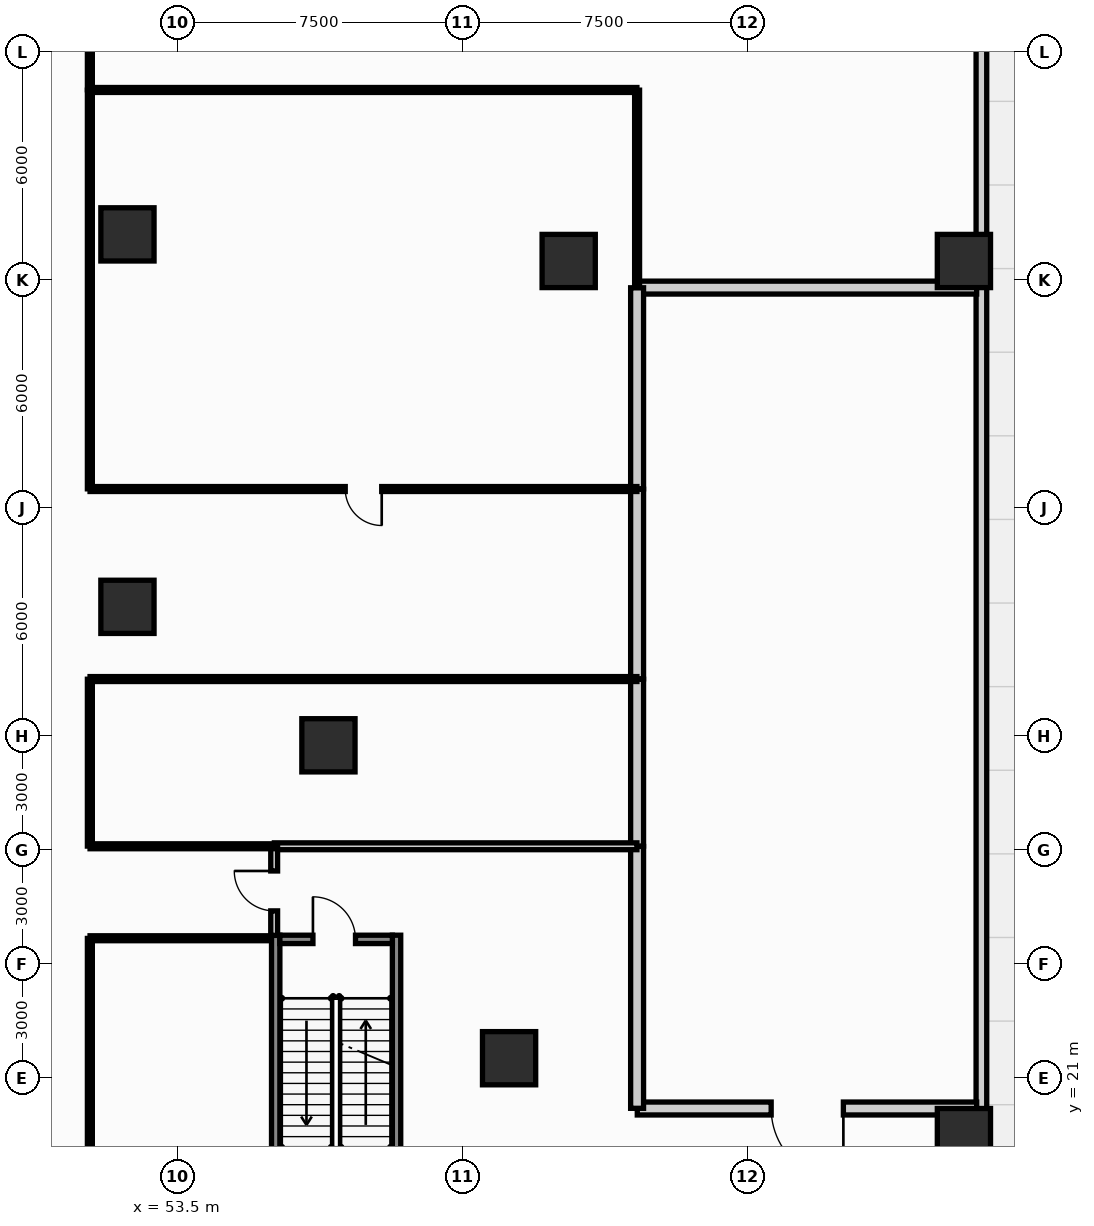
"""IFC4 building model, lengths in metres.
Left out: names, types, materials, properties, quantities, classifications, styles, units other than length and angle.
Written with IfcOpenShell. Run it as: python <this file> out.ifc"""

import sys

from ifc_helpers import new_model, si_unit, direction, frame, frame_2d, origin, origin_2d, place, context, subcontext, project, spatial, rectangle, hollow_rectangle, extrude, source, transform, mapped, element, fill, save


model = new_model("IFC4")
c1 = context("Model", 3, precision=1e-05, world=origin(), true_north=direction((0.0, 1.0)))
c2 = subcontext(c1, "Body", "Model", "MODEL_VIEW")
j1 = project(units=[si_unit("LENGTHUNIT", "METRE"), si_unit("PLANEANGLEUNIT", "RADIAN")], contexts=[c1])
p1 = place(None, origin())
s1 = spatial("IfcSite", under=j1, at=p1, CompositionType="ELEMENT")
p2 = place(p1, origin())
s2 = spatial("IfcBuilding", under=s1, at=p2, CompositionType="ELEMENT")
p3 = place(p2, origin())
s3 = spatial("IfcBuildingStorey", under=s2, at=p3, CompositionType="ELEMENT", Elevation=0.0)
for number, where, z_axis, x_axis in (
    (1, (56.09, 17.18, 0.0), (0.0, 0.0, 1.0), (0.0, 1.0, 0.0)),
    (2, (59.27, 17.18, 0.0), (0.0, 0.0, 1.0), (0.0, 1.0, 0.0)),
):
    element("IfcWall", number, at=place(p3, frame(where, z_axis=z_axis, x_axis=x_axis)), inside=s3, PredefinedType="SHEAR", context=c2, shape_type="SweptSolid", body=[
        extrude(rectangle(XDim=7.58, YDim=0.22, at=frame_2d((3.79, 0.0))), origin(), (0.0, 0.0, 1.0), 5.4),
    ])
p4 = place(p3, frame((56.2, 24.65, 0.0), z_axis=(0.0, 0.0, 1.0), x_axis=(1.0, 0.0, 0.0)))
e3 = element("IfcWall", 3, at=p4, inside=s3, PredefinedType="SHEAR", context=c2, shape_type="SweptSolid", body=[
    extrude(rectangle(XDim=2.96, YDim=0.22, at=frame_2d((1.48, 0.0))), origin(), (0.0, 0.0, 1.0), 5.4),
])
p5 = place(p4, frame((0.87, 0.0, 0.0)))
e4 = element("IfcOpeningElement", 4, at=p5, cuts=e3, PredefinedType="OPENING", context=c2, shape_type="SweptSolid", body=[
    extrude(rectangle(XDim=1.12, YDim=2.15, at=frame_2d((0.56, 1.075))), frame((0.0, 0.122, 0.0), z_axis=(0.0, -1.0, 0.0), x_axis=(1.0, 0.0, 0.0)), (0.0, 0.0, 1.0), 0.244),
])
m1 = source(origin(), c2, "Body", "SweptSolid", [
    extrude(hollow_rectangle(XDim=1.4, YDim=1.4, WallThickness=0.08, at=origin_2d()), origin(), (0.0, 0.0, 1.0), 5.401),
])
p6 = place(p3, frame((62.231, 21.523, 0.0), z_axis=(-0.010395791054, -0.021559966664, 0.999713506644), x_axis=(0.900755489191, -0.434326546151, 0.0)))
e5 = element("IfcColumn", 5, at=p6, inside=s3, PredefinedType="COLUMN", context=c2, shape_type="MappedRepresentation", body=[
    mapped(m1, transform((0.0, 0.0, 0.0), scale=1.0)),
])
m2 = source(origin(), c2, "Body", "SweptSolid", [
    extrude(hollow_rectangle(XDim=1.4, YDim=1.4, WallThickness=0.08, at=origin_2d()), origin(), (0.0, 0.0, 1.0), 5.401),
])
p7 = place(p3, frame((57.478, 29.757, 0.0), z_axis=(-0.014916896444, -0.013786828532, 0.999793683497), x_axis=(0.678742109025, -0.734376708125, 0.0)))
e6 = element("IfcColumn", 6, at=p7, inside=s3, PredefinedType="COLUMN", context=c2, shape_type="MappedRepresentation", body=[
    mapped(m2, transform((0.0, 0.0, 0.0), scale=1.0)),
])
m3 = source(origin(), c2, "Body", "SweptSolid", [
    extrude(hollow_rectangle(XDim=1.4, YDim=1.4, WallThickness=0.08, at=origin_2d()), origin(), (0.0, 0.0, 1.0), 5.4),
])
for number, where, z_axis, x_axis in (
    (7, (52.189, 33.4, 0.0), (0.0, 0.0, 1.0), (1.0, 0.0, 0.0)),
    (8, (52.189, 43.2, 0.0), (0.0, 0.0, 1.0), (1.0, 0.0, 0.0)),
    (9, (74.2, 19.5, 0.0), (0.0, 0.0, 1.0), (1.0, 0.0, 0.0)),
    (10, (74.2, 42.5, 0.0), (0.0, 0.0, 1.0), (1.0, 0.0, 0.0)),
    (11, (63.8, 42.5, 0.0), (0.0, 0.0, 1.0), (1.0, 0.0, 0.0)),
):
    element("IfcColumn", number, at=place(p3, frame(where, z_axis=z_axis, x_axis=x_axis)), inside=s3, PredefinedType="COLUMN", context=c2, shape_type="MappedRepresentation", body=[
        mapped(m3, transform((0.0, 0.0, 0.0), scale=1.0)),
    ])
p8 = place(p3, frame((74.66, 50.2, 0.0), z_axis=(0.0, 0.0, 1.0), x_axis=(0.0, -1.0, 0.0)))
e12 = element("IfcWall", 12, at=p8, inside=s3, PredefinedType="STANDARD", context=c2, shape_type="SweptSolid", body=[
    extrude(rectangle(XDim=46.4, YDim=0.28, at=frame_2d((23.2, 0.0))), origin(), (0.0, 0.0, 1.0), 4.065),
])
p9 = place(p8, frame((40.25, 0.0, 0.0)))
e13 = element("IfcOpeningElement", 13, at=p9, cuts=e12, PredefinedType="OPENING", context=c2, shape_type="SweptSolid", body=[
    extrude(rectangle(XDim=3.9, YDim=3.55, at=frame_2d((1.95, 1.775))), frame((0.0, 0.152, 0.0), z_axis=(0.0, -1.0, 0.0), x_axis=(1.0, 0.0, 0.0)), (0.0, 0.0, 1.0), 0.304),
])
p10 = place(p8, frame((35.5, 0.0, 0.0)))
e14 = element("IfcOpeningElement", 14, at=p10, cuts=e12, PredefinedType="OPENING", context=c2, shape_type="SweptSolid", body=[
    extrude(rectangle(XDim=3.5, YDim=3.55, at=frame_2d((1.75, 1.775))), frame((0.0, 0.152, 0.0), z_axis=(0.0, -1.0, 0.0), x_axis=(1.0, 0.0, 0.0)), (0.0, 0.0, 1.0), 0.304),
])
p11 = place(p8, frame((32.8, 0.0, 0.0)))
e15 = element("IfcOpeningElement", 15, at=p11, cuts=e12, PredefinedType="OPENING", context=c2, shape_type="SweptSolid", body=[
    extrude(rectangle(XDim=2.0, YDim=2.4, at=frame_2d((1.0, 1.2))), frame((0.0, 0.152, 0.0), z_axis=(0.0, -1.0, 0.0), x_axis=(1.0, 0.0, 0.0)), (0.0, 0.0, 1.0), 0.304),
])
p12 = place(p3, frame((74.535, 20.2, 0.0), z_axis=(0.0, 0.0, 1.0), x_axis=(-1.0, 0.0, 0.0)))
e16 = element("IfcWall", 16, at=p12, inside=s3, PredefinedType="PARTITIONING", context=c2, shape_type="SweptSolid", body=[
    extrude(rectangle(XDim=8.93, YDim=0.34, at=frame_2d((4.465, 0.0))), origin(), (0.0, 0.0, 1.0), 4.065),
])
p13 = place(p12, frame((3.507, 0.0, 0.0)))
e17 = element("IfcOpeningElement", 17, at=p13, cuts=e16, PredefinedType="OPENING", context=c2, shape_type="SweptSolid", body=[
    extrude(rectangle(XDim=1.9, YDim=2.35, at=frame_2d((0.95, 1.175))), frame((0.0, 0.182, 0.0), z_axis=(0.0, -1.0, 0.0), x_axis=(1.0, 0.0, 0.0)), (0.0, 0.0, 1.0), 0.364),
])
p14 = place(p3, frame((65.605, 41.8, 0.0), z_axis=(0.0, 0.0, 1.0), x_axis=(1.0, 0.0, 0.0)))
e18 = element("IfcWall", 18, at=p14, inside=s3, PredefinedType="PARTITIONING", context=c2, shape_type="SweptSolid", body=[
    extrude(rectangle(XDim=8.93, YDim=0.34, at=frame_2d((4.465, 0.0))), origin(), (0.0, 0.0, 1.0), 5.08),
])
p15 = place(p3, frame((65.6, 20.205, 0.0), z_axis=(0.0, 0.0, 1.0), x_axis=(0.0, 1.0, 0.0)))
e19 = element("IfcWall", 19, at=p15, inside=s3, PredefinedType="PARTITIONING", context=c2, shape_type="SweptSolid", body=[
    extrude(rectangle(XDim=6.89, YDim=0.34, at=frame_2d((3.445, 0.0))), origin(), (0.0, 0.0, 1.0), 5.08),
])
p16 = place(p3, frame((65.6, 36.505, 0.0), z_axis=(0.0, 0.0, 1.0), x_axis=(0.0, 1.0, 0.0)))
e20 = element("IfcWall", 20, at=p16, inside=s3, PredefinedType="PARTITIONING", context=c2, shape_type="SweptSolid", body=[
    extrude(rectangle(XDim=5.29, YDim=0.34, at=frame_2d((2.645, 0.0))), origin(), (0.0, 0.0, 1.0), 5.08),
])
p17 = place(p3, frame((65.6, 31.505, 0.0), z_axis=(0.0, 0.0, 1.0), x_axis=(0.0, 1.0, 0.0)))
e21 = element("IfcWall", 21, at=p17, inside=s3, PredefinedType="PARTITIONING", context=c2, shape_type="SweptSolid", body=[
    extrude(rectangle(XDim=4.99, YDim=0.34, at=frame_2d((2.495, 0.0))), origin(), (0.0, 0.0, 1.0), 5.08),
])
p18 = place(p3, frame((65.6, 27.105, 0.0), z_axis=(0.0, 0.0, 1.0), x_axis=(0.0, 1.0, 0.0)))
e22 = element("IfcWall", 22, at=p18, inside=s3, PredefinedType="PARTITIONING", context=c2, shape_type="SweptSolid", body=[
    extrude(rectangle(XDim=4.39, YDim=0.34, at=frame_2d((2.195, 0.0))), origin(), (0.0, 0.0, 1.0), 5.08),
])
p19 = place(p3, frame((56.055, 27.1, 0.0), z_axis=(0.0, 0.0, 1.0), x_axis=(1.0, 0.0, 0.0)))
e23 = element("IfcWall", 23, at=p19, inside=s3, PredefinedType="PARTITIONING", context=c2, shape_type="SweptSolid", body=[
    extrude(rectangle(XDim=9.54, YDim=0.18, at=frame_2d((4.77, 0.0))), origin(), (0.0, 0.0, 1.0), 5.08),
])
p20 = place(p3, frame((56.05, 24.755, 0.0), z_axis=(0.0, 0.0, 1.0), x_axis=(0.0, 1.0, 0.0)))
e24 = element("IfcWall", 24, at=p20, inside=s3, PredefinedType="PARTITIONING", context=c2, shape_type="SweptSolid", body=[
    extrude(rectangle(XDim=2.34, YDim=0.18, at=frame_2d((1.17, 0.0))), origin(), (0.0, 0.0, 1.0), 5.08),
])
p21 = place(p20, frame((0.645, 0.0, 0.0)))
e25 = element("IfcOpeningElement", 25, at=p21, cuts=e24, PredefinedType="OPENING", context=c2, shape_type="SweptSolid", body=[
    extrude(rectangle(XDim=1.05, YDim=2.15, at=frame_2d((0.525, 1.075))), frame((0.0, 0.102, 0.0), z_axis=(0.0, -1.0, 0.0), x_axis=(1.0, 0.0, 0.0)), (0.0, 0.0, 1.0), 0.204),
])
p22 = place(p3, frame((65.595, 36.5, 0.0), z_axis=(0.0, 0.0, 1.0), x_axis=(-1.0, 0.0, 0.0)))
e26 = element("IfcWall", 26, at=p22, inside=s3, PredefinedType="PARTITIONING", context=c2, shape_type="SweptSolid", body=[
    extrude(rectangle(XDim=14.39, YDim=0.13, at=frame_2d((7.195, 0.0))), origin(), (0.0, 0.0, 1.0), 5.08),
])
p23 = place(p22, frame((6.715, 0.0, 0.0)))
e27 = element("IfcOpeningElement", 27, at=p23, cuts=e26, PredefinedType="OPENING", context=c2, shape_type="SweptSolid", body=[
    extrude(rectangle(XDim=0.96, YDim=2.15, at=frame_2d((0.48, 1.075))), frame((0.0, 0.077, 0.0), z_axis=(0.0, -1.0, 0.0), x_axis=(1.0, 0.0, 0.0)), (0.0, 0.0, 1.0), 0.154),
])
for number, where, z_axis, x_axis in (
    (28, (51.205, 31.5, 0.0), (0.0, 0.0, 1.0), (1.0, 0.0, 0.0)),
    (29, (51.205, 47.0, 0.0), (0.0, 0.0, 1.0), (1.0, 0.0, 0.0)),
):
    element("IfcWall", number, at=place(p3, frame(where, z_axis=z_axis, x_axis=x_axis)), inside=s3, PredefinedType="PARTITIONING", context=c2, shape_type="SweptSolid", body=[
        extrude(rectangle(XDim=14.39, YDim=0.13, at=frame_2d((7.195, 0.0))), origin(), (0.0, 0.0, 1.0), 5.08),
    ])
p24 = place(p3, frame((51.2, 36.505, 0.0), z_axis=(0.0, 0.0, 1.0), x_axis=(0.0, 1.0, 0.0)))
e30 = element("IfcWall", 30, at=p24, inside=s3, PredefinedType="PARTITIONING", context=c2, shape_type="SweptSolid", body=[
    extrude(rectangle(XDim=10.49, YDim=0.13, at=frame_2d((5.245, 0.0))), origin(), (0.0, 0.0, 1.0), 5.08),
])
p25 = place(p3, frame((51.2, 15.205, 0.0), z_axis=(0.0, 0.0, 1.0), x_axis=(0.0, 1.0, 0.0)))
e31 = element("IfcWall", 31, at=p25, inside=s3, PredefinedType="PARTITIONING", context=c2, shape_type="SweptSolid", body=[
    extrude(rectangle(XDim=9.47, YDim=0.13, at=frame_2d((4.735, 0.0))), origin(), (0.0, 0.0, 1.0), 5.08),
])
p26 = place(p3, frame((65.6, 46.995, 0.0), z_axis=(0.0, 0.0, 1.0), x_axis=(0.0, -1.0, 0.0)))
e32 = element("IfcWall", 32, at=p26, inside=s3, PredefinedType="PARTITIONING", context=c2, shape_type="SweptSolid", body=[
    extrude(rectangle(XDim=5.19, YDim=0.13, at=frame_2d((2.595, 0.0))), origin(), (0.0, 0.0, 1.0), 5.08),
])
p27 = place(p3, frame((56.045, 27.1, 0.0), z_axis=(0.0, 0.0, 1.0), x_axis=(-1.0, 0.0, 0.0)))
e33 = element("IfcWall", 33, at=p27, inside=s3, PredefinedType="PARTITIONING", context=c2, shape_type="SweptSolid", body=[
    extrude(rectangle(XDim=4.84, YDim=0.13, at=frame_2d((2.42, 0.0))), origin(), (0.0, 0.0, 1.0), 5.08),
])
p28 = place(p3, frame((51.205, 24.68, 0.0), z_axis=(0.0, 0.0, 1.0), x_axis=(1.0, 0.0, 0.0)))
e34 = element("IfcWall", 34, at=p28, inside=s3, PredefinedType="PARTITIONING", context=c2, shape_type="SweptSolid", body=[
    extrude(rectangle(XDim=4.77, YDim=0.13, at=frame_2d((2.385, 0.0))), origin(), (0.0, 0.0, 1.0), 5.08),
])
p29 = place(p3, frame((51.2, 27.105, 0.0), z_axis=(0.0, 0.0, 1.0), x_axis=(0.0, 1.0, 0.0)))
e35 = element("IfcWall", 35, at=p29, inside=s3, PredefinedType="PARTITIONING", context=c2, shape_type="SweptSolid", body=[
    extrude(rectangle(XDim=4.39, YDim=0.13, at=frame_2d((2.195, 0.0))), origin(), (0.0, 0.0, 1.0), 5.08),
])
p30 = place(p3, frame((51.2, 49.9, 0.0), z_axis=(0.0, 0.0, 1.0), x_axis=(0.0, -1.0, 0.0)))
e36 = element("IfcWall", 36, at=p30, inside=s3, PredefinedType="PARTITIONING", context=c2, shape_type="SweptSolid", body=[
    extrude(rectangle(XDim=2.895, YDim=0.13, at=frame_2d((1.448, 0.0))), origin(), (0.0, 0.0, 1.0), 5.08),
])
p31 = place(p5, origin())
e37 = element("IfcDoor", 37, at=p31, inside=s3, OperationType="SINGLE_SWING_LEFT", PredefinedType="DOOR", context=c2, shape_type="SweptSolid", body=[
    extrude(rectangle(XDim=1.12, YDim=2.15, at=frame_2d((0.56, 1.075))), frame((0.0, 0.025, 0.0), z_axis=(0.0, -1.0, 0.0), x_axis=(1.0, 0.0, 0.0)), (0.0, 0.0, 1.0), 0.05),
])
fill(e4, e37)
p32 = place(p13, origin())
e38 = element("IfcDoor", 38, at=p32, inside=s3, OperationType="DOUBLE_DOOR_SINGLE_SWING", PredefinedType="DOOR", context=c2, shape_type="SweptSolid", body=[
    extrude(rectangle(XDim=1.9, YDim=2.35, at=frame_2d((0.95, 1.175))), frame((0.0, 0.025, 0.0), z_axis=(0.0, -1.0, 0.0), x_axis=(1.0, 0.0, 0.0)), (0.0, 0.0, 1.0), 0.05),
])
fill(e17, e38)
p33 = place(p21, origin())
e39 = element("IfcDoor", 39, at=p33, inside=s3, OperationType="SINGLE_SWING_RIGHT", PredefinedType="DOOR", context=c2, shape_type="SweptSolid", body=[
    extrude(rectangle(XDim=1.05, YDim=2.15, at=frame_2d((0.525, 1.075))), frame((0.0, 0.025, 0.0), z_axis=(0.0, -1.0, 0.0), x_axis=(1.0, 0.0, 0.0)), (0.0, 0.0, 1.0), 0.05),
])
fill(e25, e39)
p34 = place(p23, origin())
e40 = element("IfcDoor", 40, at=p34, inside=s3, OperationType="SINGLE_SWING_LEFT", PredefinedType="DOOR", context=c2, shape_type="SweptSolid", body=[
    extrude(rectangle(XDim=0.96, YDim=2.15, at=frame_2d((0.48, 1.075))), frame((0.0, 0.025, 0.0), z_axis=(0.0, -1.0, 0.0), x_axis=(1.0, 0.0, 0.0)), (0.0, 0.0, 1.0), 0.05),
])
fill(e27, e40)
save(model, sys.argv[1])
